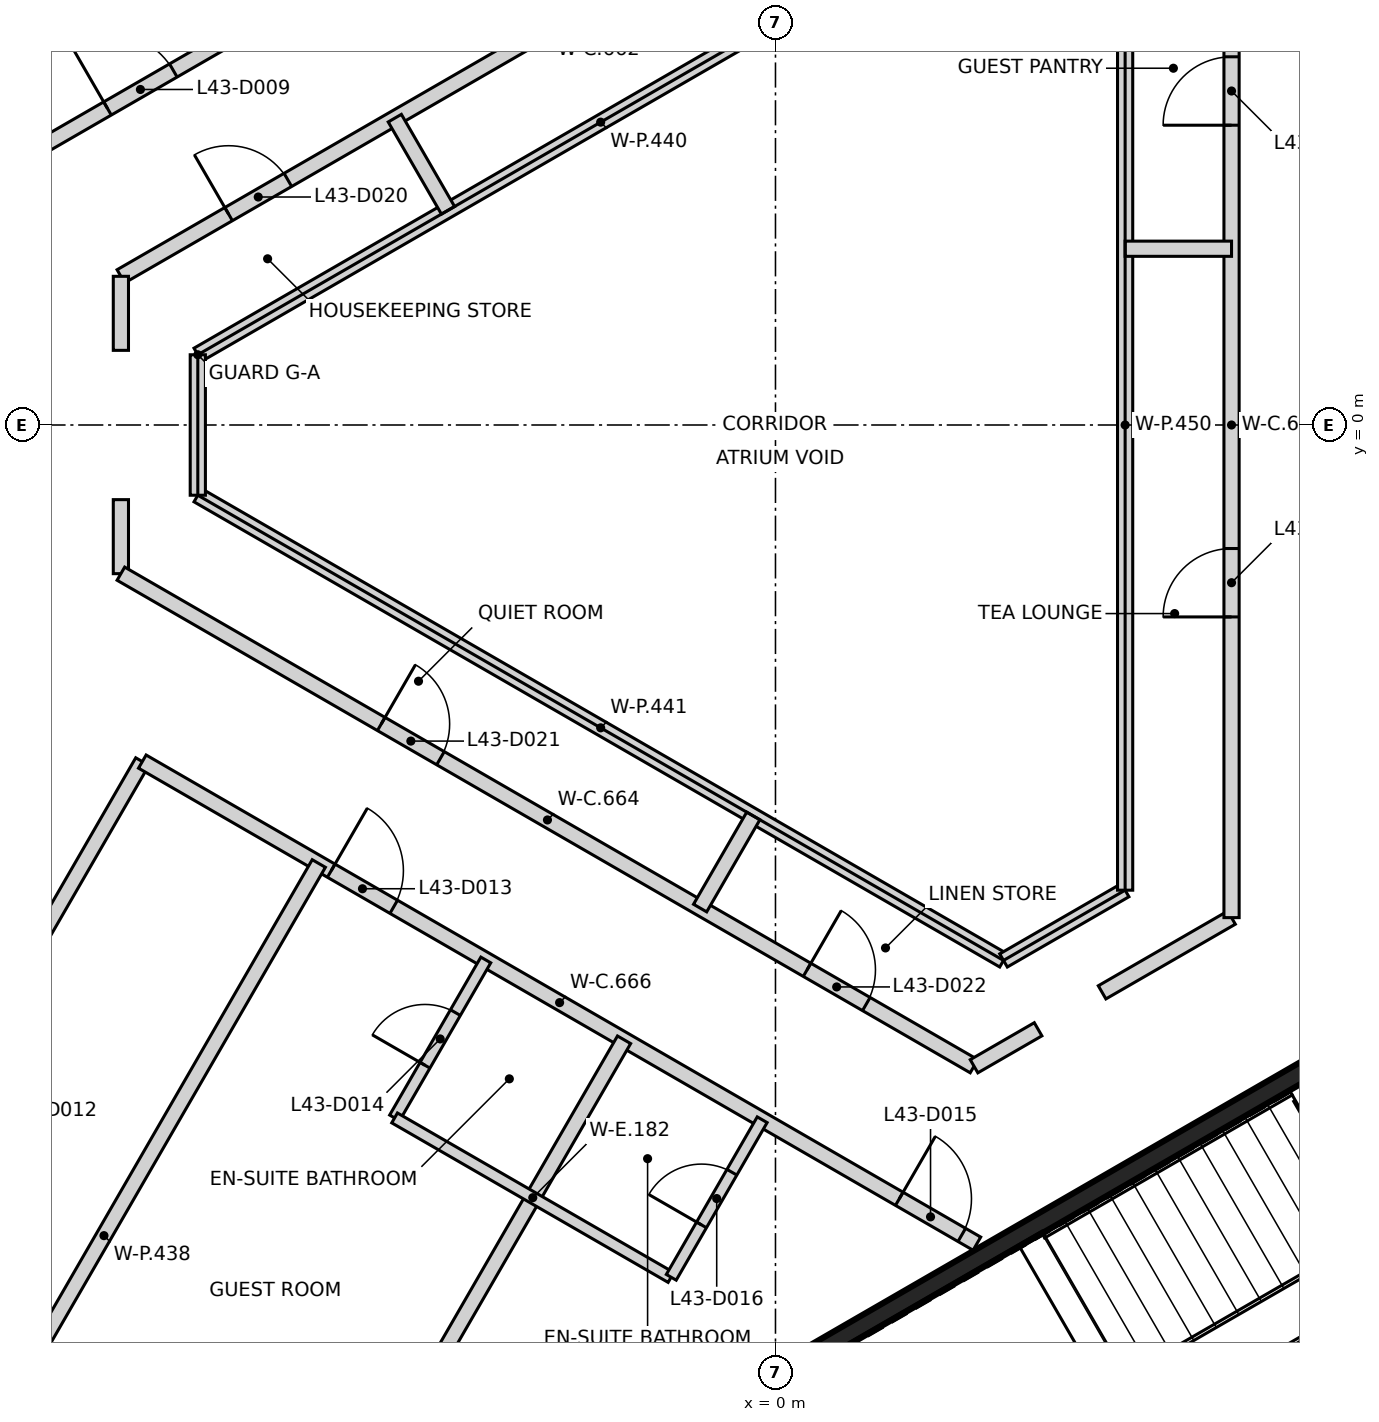
"""IFC4 building model, lengths in metres.
Left out: names, types, materials, properties, quantities, classifications, styles, units other than length and angle.
Written with IfcOpenShell. Run it as: python <this file> out.ifc"""

import sys

from ifc_helpers import new_model, si_unit, direction, frame, frame_2d, origin, place, context, subcontext, project, spatial, rectangle, extrude, element, fill, save


model = new_model("IFC4")
c1 = context("Model", 3, precision=1e-05, world=origin(), true_north=direction((0.0, 1.0)))
c2 = subcontext(c1, "Body", "Model", "MODEL_VIEW")
j1 = project(units=[si_unit("LENGTHUNIT", "METRE"), si_unit("PLANEANGLEUNIT", "RADIAN")], contexts=[c1])
p1 = place(None, origin())
s1 = spatial("IfcSite", under=j1, at=p1, CompositionType="ELEMENT")
p2 = place(p1, origin())
s2 = spatial("IfcBuilding", under=s1, at=p2, CompositionType="ELEMENT")
p3 = place(p2, frame((0.0, 0.0, 175.6)))
s3 = spatial("IfcBuildingStorey", under=s2, at=p3, CompositionType="ELEMENT", Elevation=175.6)
p4 = place(p3, frame((0.417, -12.273, 0.0), z_axis=(0.0, 0.0, 1.0), x_axis=(0.866021906294, 0.500006057782, 0.0)))
e1 = element("IfcWall", 1, at=p4, inside=s3, PredefinedType="SHEAR", context=c2, shape_type="SweptSolid", body=[
    extrude(rectangle(XDim=11.55, YDim=0.25, at=frame_2d((5.775, 0.0))), origin(), (0.0, 0.0, 1.0), 3.25),
])
p5 = place(p4, frame((10.025, 0.0, 0.0)))
e2 = element("IfcOpeningElement", 2, at=p5, cuts=e1, PredefinedType="OPENING", context=c2, shape_type="SweptSolid", body=[
    extrude(rectangle(XDim=1.2, YDim=2.1, at=frame_2d((0.6, 1.05))), frame((0.0, 0.135, 0.0), z_axis=(0.0, -1.0, 0.0), x_axis=(1.0, 0.0, 0.0)), (0.0, 0.0, 1.0), 0.27),
])
p6 = place(p4, frame((8.725, 0.0, 0.0)))
e3 = element("IfcOpeningElement", 3, at=p6, cuts=e1, PredefinedType="OPENING", context=c2, shape_type="SweptSolid", body=[
    extrude(rectangle(XDim=1.2, YDim=2.1, at=frame_2d((0.6, 1.05))), frame((0.0, 0.135, 0.0), z_axis=(0.0, -1.0, 0.0), x_axis=(1.0, 0.0, 0.0)), (0.0, 0.0, 1.0), 0.27),
])
p7 = place(p3, frame((-10.652, 3.088, 0.0), z_axis=(0.0, 0.0, 1.0), x_axis=(0.866031821623, 0.499988883812, 0.0)))
e4 = element("IfcWall", 4, at=p7, inside=s3, PredefinedType="PARTITIONING", context=c2, shape_type="SweptSolid", body=[
    extrude(rectangle(XDim=12.638, YDim=0.2, at=frame_2d((6.319, 0.0))), origin(), (0.0, 0.0, 1.0), 3.25),
])
p8 = place(p7, frame((10.813, 0.0, 0.0)))
e5 = element("IfcOpeningElement", 5, at=p8, cuts=e4, PredefinedType="OPENING", context=c2, shape_type="SweptSolid", body=[
    extrude(rectangle(XDim=1.0, YDim=2.1, at=frame_2d((0.5, 1.05))), frame((0.0, 0.11, 0.0), z_axis=(0.0, -1.0, 0.0), x_axis=(1.0, 0.0, 0.0)), (0.0, 0.0, 1.0), 0.22),
])
p9 = place(p7, frame((8.862, 0.0, 0.0)))
e6 = element("IfcOpeningElement", 6, at=p9, cuts=e4, PredefinedType="OPENING", context=c2, shape_type="SweptSolid", body=[
    extrude(rectangle(XDim=0.95, YDim=2.1, at=frame_2d((0.475, 1.05))), frame((0.0, 0.11, 0.0), z_axis=(0.0, -1.0, 0.0), x_axis=(1.0, 0.0, 0.0)), (0.0, 0.0, 1.0), 0.22),
])
p10 = place(p7, frame((2.153, 0.0, 0.0)))
e7 = element("IfcOpeningElement", 7, at=p10, cuts=e4, PredefinedType="OPENING", context=c2, shape_type="SweptSolid", body=[
    extrude(rectangle(XDim=1.0, YDim=2.1, at=frame_2d((0.5, 1.05))), frame((0.0, 0.11, 0.0), z_axis=(0.0, -1.0, 0.0), x_axis=(1.0, 0.0, 0.0)), (0.0, 0.0, 1.0), 0.22),
])
p11 = place(p3, frame((-9.809, -6.99, 0.0), z_axis=(0.0, 0.0, 1.0), x_axis=(0.499955822529, 0.866050908157, 0.0)))
e8 = element("IfcWall", 8, at=p11, inside=s3, PredefinedType="PARTITIONING", context=c2, shape_type="SweptSolid", body=[
    extrude(rectangle(XDim=2.958, YDim=0.2, at=frame_2d((1.479, 0.0))), origin(), (0.0, 0.0, 1.0), 3.25),
])
p12 = place(p3, frame((-8.612, 1.956, 0.0), z_axis=(0.0, 0.0, 1.0), x_axis=(0.866034386606, 0.499984440973, 0.0)))
e9 = element("IfcWall", 9, at=p12, inside=s3, PredefinedType="PARTITIONING", context=c2, shape_type="SweptSolid", body=[
    extrude(rectangle(XDim=12.96, YDim=0.2, at=frame_2d((6.48, 0.0))), origin(), (0.0, 0.0, 1.0), 3.25),
])
p13 = place(p12, frame((8.105, 0.0, 0.0)))
e10 = element("IfcOpeningElement", 10, at=p13, cuts=e9, PredefinedType="OPENING", context=c2, shape_type="SweptSolid", body=[
    extrude(rectangle(XDim=0.9, YDim=2.1, at=frame_2d((0.45, 1.05))), frame((0.0, 0.11, 0.0), z_axis=(0.0, -1.0, 0.0), x_axis=(1.0, 0.0, 0.0)), (0.0, 0.0, 1.0), 0.22),
])
p14 = place(p12, frame((1.637, 0.0, 0.0)))
e11 = element("IfcOpeningElement", 11, at=p14, cuts=e9, PredefinedType="OPENING", context=c2, shape_type="SweptSolid", body=[
    extrude(rectangle(XDim=0.9, YDim=2.1, at=frame_2d((0.45, 1.05))), frame((0.0, 0.11, 0.0), z_axis=(0.0, -1.0, 0.0), x_axis=(1.0, 0.0, 0.0)), (0.0, 0.0, 1.0), 0.22),
])
p15 = place(p3, frame((-8.612, -1.956, 0.0), z_axis=(0.0, 0.0, 1.0), x_axis=(0.0, 1.0, 0.0)))
e12 = element("IfcWall", 12, at=p15, inside=s3, PredefinedType="PARTITIONING", context=c2, shape_type="SweptSolid", body=[
    extrude(rectangle(XDim=0.974, YDim=0.2, at=frame_2d((0.487, 0.0))), origin(), (0.0, 0.0, 1.0), 3.25),
])
p16 = place(p3, frame((-8.612, -1.956, 0.0), z_axis=(0.0, 0.0, 1.0), x_axis=(0.866034386606, -0.499984440973, 0.0)))
e13 = element("IfcWall", 13, at=p16, inside=s3, PredefinedType="PARTITIONING", context=c2, shape_type="SweptSolid", body=[
    extrude(rectangle(XDim=12.96, YDim=0.2, at=frame_2d((6.48, 0.0))), origin(), (0.0, 0.0, 1.0), 3.25),
])
p17 = place(p16, frame((3.955, 0.0, 0.0)))
e14 = element("IfcOpeningElement", 14, at=p17, cuts=e13, PredefinedType="OPENING", context=c2, shape_type="SweptSolid", body=[
    extrude(rectangle(XDim=0.9, YDim=2.1, at=frame_2d((0.45, 1.05))), frame((0.0, 0.11, 0.0), z_axis=(0.0, -1.0, 0.0), x_axis=(1.0, 0.0, 0.0)), (0.0, 0.0, 1.0), 0.22),
])
p18 = place(p16, frame((10.424, 0.0, 0.0)))
e15 = element("IfcOpeningElement", 15, at=p18, cuts=e13, PredefinedType="OPENING", context=c2, shape_type="SweptSolid", body=[
    extrude(rectangle(XDim=0.9, YDim=2.1, at=frame_2d((0.45, 1.05))), frame((0.0, 0.11, 0.0), z_axis=(0.0, -1.0, 0.0), x_axis=(1.0, 0.0, 0.0)), (0.0, 0.0, 1.0), 0.22),
])
p19 = place(p3, frame((-8.612, 0.982, 0.0), z_axis=(0.0, 0.0, 1.0), x_axis=(0.0, 1.0, 0.0)))
e16 = element("IfcWall", 16, at=p19, inside=s3, PredefinedType="PARTITIONING", context=c2, shape_type="SweptSolid", body=[
    extrude(rectangle(XDim=0.974, YDim=0.2, at=frame_2d((0.487, 0.0))), origin(), (0.0, 0.0, 1.0), 3.25),
])
p20 = place(p3, frame((-8.33, -4.428, 0.0), z_axis=(0.0, 0.0, 1.0), x_axis=(0.865923263811, -0.500176869909, 0.0)))
e17 = element("IfcWall", 17, at=p20, inside=s3, PredefinedType="PARTITIONING", context=c2, shape_type="SweptSolid", body=[
    extrude(rectangle(XDim=12.68, YDim=0.2, at=frame_2d((6.34, 0.0))), origin(), (0.0, 0.0, 1.0), 3.25),
])
p21 = place(p20, frame((2.87, 0.0, 0.0)))
e18 = element("IfcOpeningElement", 18, at=p21, cuts=e17, PredefinedType="OPENING", context=c2, shape_type="SweptSolid", body=[
    extrude(rectangle(XDim=0.95, YDim=2.1, at=frame_2d((0.475, 1.05))), frame((0.0, 0.11, 0.0), z_axis=(0.0, -1.0, 0.0), x_axis=(1.0, 0.0, 0.0)), (0.0, 0.0, 1.0), 0.22),
])
p22 = place(p20, frame((11.5, 0.0, 0.0)))
e19 = element("IfcOpeningElement", 19, at=p22, cuts=e17, PredefinedType="OPENING", context=c2, shape_type="SweptSolid", body=[
    extrude(rectangle(XDim=0.95, YDim=2.1, at=frame_2d((0.475, 1.05))), frame((0.0, 0.11, 0.0), z_axis=(0.0, -1.0, 0.0), x_axis=(1.0, 0.0, 0.0)), (0.0, 0.0, 1.0), 0.22),
])
p23 = place(p3, frame((2.612, -8.437, 0.0), z_axis=(0.0, 0.0, 1.0), x_axis=(0.866026830048, 0.499997529631, 0.0)))
e20 = element("IfcWall", 20, at=p23, inside=s3, PredefinedType="PARTITIONING", context=c2, shape_type="SweptSolid", body=[
    extrude(rectangle(XDim=0.973, YDim=0.2, at=frame_2d((0.487, 0.0))), origin(), (0.0, 0.0, 1.0), 3.25),
])
p24 = place(p3, frame((4.297, -7.464, 0.0), z_axis=(0.0, 0.0, 1.0), x_axis=(0.866026378386, 0.499998311937, 0.0)))
e21 = element("IfcWall", 21, at=p24, inside=s3, PredefinedType="PARTITIONING", context=c2, shape_type="SweptSolid", body=[
    extrude(rectangle(XDim=1.966, YDim=0.2, at=frame_2d((0.983, 0.0))), origin(), (0.0, 0.0, 1.0), 3.25),
])
p25 = place(p3, frame((6.0, -6.481, 0.0), z_axis=(0.0, 0.0, 1.0), x_axis=(0.0, 1.0, 0.0)))
e22 = element("IfcWall", 22, at=p25, inside=s3, PredefinedType="PARTITIONING", context=c2, shape_type="SweptSolid", body=[
    extrude(rectangle(XDim=12.962, YDim=0.2, at=frame_2d((6.481, 0.0))), origin(), (0.0, 0.0, 1.0), 3.25),
])
p26 = place(p25, frame((3.956, 0.0, 0.0)))
e23 = element("IfcOpeningElement", 23, at=p26, cuts=e22, PredefinedType="OPENING", context=c2, shape_type="SweptSolid", body=[
    extrude(rectangle(XDim=0.9, YDim=2.1, at=frame_2d((0.45, 1.05))), frame((0.0, 0.11, 0.0), z_axis=(0.0, -1.0, 0.0), x_axis=(1.0, 0.0, 0.0)), (0.0, 0.0, 1.0), 0.22),
])
p27 = place(p25, frame((10.425, 0.0, 0.0)))
e24 = element("IfcOpeningElement", 24, at=p27, cuts=e22, PredefinedType="OPENING", context=c2, shape_type="SweptSolid", body=[
    extrude(rectangle(XDim=0.9, YDim=2.1, at=frame_2d((0.45, 1.05))), frame((0.0, 0.11, 0.0), z_axis=(0.0, -1.0, 0.0), x_axis=(1.0, 0.0, 0.0)), (0.0, 0.0, 1.0), 0.22),
])
p28 = place(p3, frame((-11.661, -15.561, 0.0), z_axis=(0.0, 0.0, 1.0), x_axis=(0.500012795616, 0.866018016106, 0.0)))
e25 = element("IfcWall", 25, at=p28, inside=s3, PredefinedType="PARTITIONING", context=c2, shape_type="SweptSolid", body=[
    extrude(rectangle(XDim=11.306, YDim=0.2, at=frame_2d((5.653, 0.0))), origin(), (0.0, 0.0, 1.0), 3.25),
])
for number, where, z_axis, x_axis in (
    (26, (-7.6, 0.924, 0.0), (0.0, 0.0, 1.0), (0.866, 0.5, 0.0)),
    (27, (-7.6, -0.924, 0.0), (0.0, 0.0, 1.0), (0.866, -0.5, 0.0)),
):
    element("IfcWall", number, at=place(p3, frame(where, z_axis=z_axis, x_axis=x_axis)), inside=s3, PredefinedType="PARTITIONING", context=c2, shape_type="SweptSolid", body=[
        extrude(rectangle(XDim=12.24, YDim=0.2, at=frame_2d((6.12, 0.0))), origin(), (0.0, 0.0, 1.0), 3.25),
    ])
p29 = place(p3, frame((-7.6, -0.924, 0.0), z_axis=(0.0, 0.0, 1.0), x_axis=(0.0, 1.0, 0.0)))
e28 = element("IfcWall", 28, at=p29, inside=s3, PredefinedType="PARTITIONING", context=c2, shape_type="SweptSolid", body=[
    extrude(rectangle(XDim=1.848, YDim=0.2, at=frame_2d((0.924, 0.0))), origin(), (0.0, 0.0, 1.0), 3.25),
])
p30 = place(p3, frame((-7.646, -17.879, 0.0), z_axis=(0.0, 0.0, 1.0), x_axis=(0.500031496802, 0.866007218334, 0.0)))
e29 = element("IfcWall", 29, at=p30, inside=s3, PredefinedType="PARTITIONING", context=c2, shape_type="SweptSolid", body=[
    extrude(rectangle(XDim=11.306, YDim=0.2, at=frame_2d((5.653, 0.0))), origin(), (0.0, 0.0, 1.0), 3.25),
])
p31 = place(p3, frame((-5.008, 4.037, 0.0), z_axis=(0.0, 0.0, 1.0), x_axis=(0.49996389635, -0.866046247233, 0.0)))
e30 = element("IfcWall", 30, at=p31, inside=s3, PredefinedType="PARTITIONING", context=c2, shape_type="SweptSolid", body=[
    extrude(rectangle(XDim=1.4, YDim=0.2, at=frame_2d((0.7, 0.0))), origin(), (0.0, 0.0, 1.0), 3.25),
])
p32 = place(p3, frame((-0.992, -6.355, 0.0), z_axis=(0.0, 0.0, 1.0), x_axis=(0.500059638837, 0.865990968548, 0.0)))
e31 = element("IfcWall", 31, at=p32, inside=s3, PredefinedType="PARTITIONING", context=c2, shape_type="SweptSolid", body=[
    extrude(rectangle(XDim=1.4, YDim=0.2, at=frame_2d((0.7, 0.0))), origin(), (0.0, 0.0, 1.0), 3.25),
])
p33 = place(p3, frame((3.0, -7.044, 0.0), z_axis=(0.0, 0.0, 1.0), x_axis=(0.865875248522, 0.500259986404, 0.0)))
e32 = element("IfcWall", 32, at=p33, inside=s3, PredefinedType="PARTITIONING", context=c2, shape_type="SweptSolid", body=[
    extrude(rectangle(XDim=1.848, YDim=0.2, at=frame_2d((0.924, 0.0))), origin(), (0.0, 0.0, 1.0), 3.25),
])
p34 = place(p3, frame((4.6, -6.12, 0.0), z_axis=(0.0, 0.0, 1.0), x_axis=(0.0, 1.0, 0.0)))
e33 = element("IfcWall", 33, at=p34, inside=s3, PredefinedType="PARTITIONING", context=c2, shape_type="SweptSolid", body=[
    extrude(rectangle(XDim=12.24, YDim=0.2, at=frame_2d((6.12, 0.0))), origin(), (0.0, 0.0, 1.0), 3.25),
])
p35 = place(p3, frame((4.6, 2.319, 0.0), z_axis=(0.0, 0.0, 1.0), x_axis=(1.0, 0.0, 0.0)))
e34 = element("IfcWall", 34, at=p35, inside=s3, PredefinedType="PARTITIONING", context=c2, shape_type="SweptSolid", body=[
    extrude(rectangle(XDim=1.4, YDim=0.2, at=frame_2d((0.7, 0.0))), origin(), (0.0, 0.0, 1.0), 3.25),
])
p36 = place(p3, frame((-5.011, -9.116, 0.0), z_axis=(0.0, 0.0, 1.0), x_axis=(0.500089422704, 0.865973769406, 0.0)))
e35 = element("IfcWall", 35, at=p36, inside=s3, PredefinedType="PARTITIONING", context=c2, shape_type="SweptSolid", body=[
    extrude(rectangle(XDim=2.399, YDim=0.15, at=frame_2d((1.2, 0.0))), origin(), (0.0, 0.0, 1.0), 3.25),
])
p37 = place(p36, frame((0.8, 0.0, 0.0)))
e36 = element("IfcOpeningElement", 36, at=p37, cuts=e35, PredefinedType="OPENING", context=c2, shape_type="SweptSolid", body=[
    extrude(rectangle(XDim=0.8, YDim=2.1, at=frame_2d((0.4, 1.05))), frame((0.0, 0.085, 0.0), z_axis=(0.0, -1.0, 0.0), x_axis=(1.0, 0.0, 0.0)), (0.0, 0.0, 1.0), 0.17),
])
p38 = place(p3, frame((-5.011, -9.116, 0.0), z_axis=(0.0, 0.0, 1.0), x_axis=(0.866062607352, -0.499935555993, 0.0)))
e37 = element("IfcWall", 37, at=p38, inside=s3, PredefinedType="PARTITIONING", context=c2, shape_type="SweptSolid", body=[
    extrude(rectangle(XDim=4.198, YDim=0.15, at=frame_2d((2.099, 0.0))), origin(), (0.0, 0.0, 1.0), 3.25),
])
p39 = place(p3, frame((-1.371, -11.213, 0.0), z_axis=(0.0, 0.0, 1.0), x_axis=(0.499748946523, 0.866170301066, 0.0)))
e38 = element("IfcWall", 38, at=p39, inside=s3, PredefinedType="PARTITIONING", context=c2, shape_type="SweptSolid", body=[
    extrude(rectangle(XDim=2.393, YDim=0.15, at=frame_2d((1.197, 0.0))), origin(), (0.0, 0.0, 1.0), 3.25),
])
p40 = place(p39, frame((0.796, 0.0, 0.0)))
e39 = element("IfcOpeningElement", 39, at=p40, cuts=e38, PredefinedType="OPENING", context=c2, shape_type="SweptSolid", body=[
    extrude(rectangle(XDim=0.8, YDim=2.1, at=frame_2d((0.4, 1.05))), frame((0.0, 0.085, 0.0), z_axis=(0.0, -1.0, 0.0), x_axis=(1.0, 0.0, 0.0)), (0.0, 0.0, 1.0), 0.17),
])
p41 = place(p10, origin())
e40 = element("IfcDoor", 40, at=p41, inside=s3, OperationType="SINGLE_SWING_LEFT", PredefinedType="DOOR", context=c2, shape_type="SweptSolid", body=[
    extrude(rectangle(XDim=1.0, YDim=2.1, at=frame_2d((0.5, 1.05))), frame((0.0, 0.025, 0.0), z_axis=(0.0, -1.0, 0.0), x_axis=(1.0, 0.0, 0.0)), (0.0, 0.0, 1.0), 0.05),
])
fill(e7, e40)
p42 = place(p21, frame((0.95, 0.0, 0.0), z_axis=(0.0, 0.0, 1.0), x_axis=(-1.0, 0.0, 0.0)))
e41 = element("IfcDoor", 41, at=p42, inside=s3, OperationType="SINGLE_SWING_LEFT", PredefinedType="DOOR", context=c2, shape_type="SweptSolid", body=[
    extrude(rectangle(XDim=0.95, YDim=2.1, at=frame_2d((0.475, 1.05))), frame((0.0, 0.025, 0.0), z_axis=(0.0, -1.0, 0.0), x_axis=(1.0, 0.0, 0.0)), (0.0, 0.0, 1.0), 0.05),
])
fill(e18, e41)
p43 = place(p37, origin())
e42 = element("IfcDoor", 42, at=p43, inside=s3, OperationType="SINGLE_SWING_LEFT", PredefinedType="DOOR", context=c2, shape_type="SweptSolid", body=[
    extrude(rectangle(XDim=0.8, YDim=2.1, at=frame_2d((0.4, 1.05))), frame((0.0, 0.025, 0.0), z_axis=(0.0, -1.0, 0.0), x_axis=(1.0, 0.0, 0.0)), (0.0, 0.0, 1.0), 0.05),
])
fill(e36, e42)
p44 = place(p22, frame((0.95, 0.0, 0.0), z_axis=(0.0, 0.0, 1.0), x_axis=(-1.0, 0.0, 0.0)))
e43 = element("IfcDoor", 43, at=p44, inside=s3, OperationType="SINGLE_SWING_LEFT", PredefinedType="DOOR", context=c2, shape_type="SweptSolid", body=[
    extrude(rectangle(XDim=0.95, YDim=2.1, at=frame_2d((0.475, 1.05))), frame((0.0, 0.025, 0.0), z_axis=(0.0, -1.0, 0.0), x_axis=(1.0, 0.0, 0.0)), (0.0, 0.0, 1.0), 0.05),
])
fill(e19, e43)
p45 = place(p40, frame((0.8, 0.0, 0.0), z_axis=(0.0, 0.0, 1.0), x_axis=(-1.0, 0.0, 0.0)))
e44 = element("IfcDoor", 44, at=p45, inside=s3, OperationType="SINGLE_SWING_LEFT", PredefinedType="DOOR", context=c2, shape_type="SweptSolid", body=[
    extrude(rectangle(XDim=0.8, YDim=2.1, at=frame_2d((0.4, 1.05))), frame((0.0, 0.025, 0.0), z_axis=(0.0, -1.0, 0.0), x_axis=(1.0, 0.0, 0.0)), (0.0, 0.0, 1.0), 0.05),
])
fill(e39, e44)
p46 = place(p26, origin())
e45 = element("IfcDoor", 45, at=p46, inside=s3, OperationType="SINGLE_SWING_LEFT", PredefinedType="DOOR", context=c2, shape_type="SweptSolid", body=[
    extrude(rectangle(XDim=0.9, YDim=2.1, at=frame_2d((0.45, 1.05))), frame((0.0, 0.025, 0.0), z_axis=(0.0, -1.0, 0.0), x_axis=(1.0, 0.0, 0.0)), (0.0, 0.0, 1.0), 0.05),
])
fill(e23, e45)
p47 = place(p27, origin())
e46 = element("IfcDoor", 46, at=p47, inside=s3, OperationType="SINGLE_SWING_LEFT", PredefinedType="DOOR", context=c2, shape_type="SweptSolid", body=[
    extrude(rectangle(XDim=0.9, YDim=2.1, at=frame_2d((0.45, 1.05))), frame((0.0, 0.025, 0.0), z_axis=(0.0, -1.0, 0.0), x_axis=(1.0, 0.0, 0.0)), (0.0, 0.0, 1.0), 0.05),
])
fill(e24, e46)
p48 = place(p14, frame((0.9, 0.0, 0.0), z_axis=(0.0, 0.0, 1.0), x_axis=(-1.0, 0.0, 0.0)))
e47 = element("IfcDoor", 47, at=p48, inside=s3, OperationType="SINGLE_SWING_LEFT", PredefinedType="DOOR", context=c2, shape_type="SweptSolid", body=[
    extrude(rectangle(XDim=0.9, YDim=2.1, at=frame_2d((0.45, 1.05))), frame((0.0, 0.025, 0.0), z_axis=(0.0, -1.0, 0.0), x_axis=(1.0, 0.0, 0.0)), (0.0, 0.0, 1.0), 0.05),
])
fill(e11, e47)
p49 = place(p17, origin())
e48 = element("IfcDoor", 48, at=p49, inside=s3, OperationType="SINGLE_SWING_LEFT", PredefinedType="DOOR", context=c2, shape_type="SweptSolid", body=[
    extrude(rectangle(XDim=0.9, YDim=2.1, at=frame_2d((0.45, 1.05))), frame((0.0, 0.025, 0.0), z_axis=(0.0, -1.0, 0.0), x_axis=(1.0, 0.0, 0.0)), (0.0, 0.0, 1.0), 0.05),
])
fill(e14, e48)
p50 = place(p18, origin())
e49 = element("IfcDoor", 49, at=p50, inside=s3, OperationType="SINGLE_SWING_LEFT", PredefinedType="DOOR", context=c2, shape_type="SweptSolid", body=[
    extrude(rectangle(XDim=0.9, YDim=2.1, at=frame_2d((0.45, 1.05))), frame((0.0, 0.025, 0.0), z_axis=(0.0, -1.0, 0.0), x_axis=(1.0, 0.0, 0.0)), (0.0, 0.0, 1.0), 0.05),
])
fill(e15, e49)
save(model, sys.argv[1])
